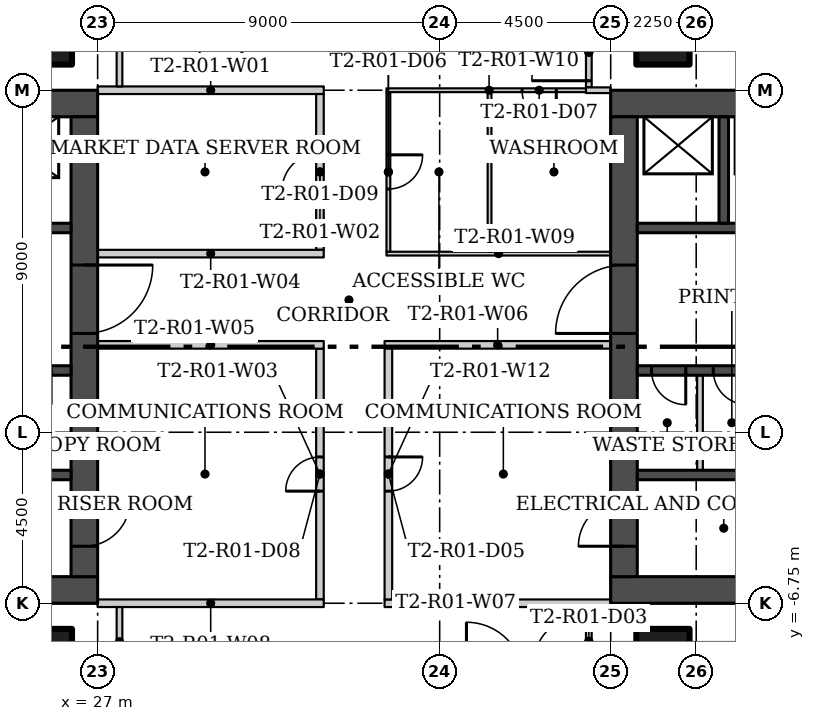
"""IFC4 building model, lengths in metres.
Left out: names, types, materials, properties, quantities, classifications, styles, units other than length and angle.
Written with IfcOpenShell. Run it as: python <this file> out.ifc"""

import sys

from ifc_helpers import new_model, si_unit, direction, frame, frame_2d, origin, origin_2d, place, context, subcontext, project, spatial, rectangle, hollow_rectangle, extrude, element, fill, save


model = new_model("IFC4")
c1 = context("Model", 3, precision=1e-05, world=origin(), true_north=direction((0.0, 1.0)))
c2 = subcontext(c1, "Body", "Model", "MODEL_VIEW")
j1 = project(units=[si_unit("LENGTHUNIT", "METRE"), si_unit("PLANEANGLEUNIT", "RADIAN")], contexts=[c1])
p1 = place(None, origin())
s1 = spatial("IfcSite", under=j1, at=p1, CompositionType="ELEMENT")
p2 = place(p1, origin())
s2 = spatial("IfcBuilding", under=s1, at=p2, CompositionType="ELEMENT")
p3 = place(p2, frame((0.0, 0.0, 28.5)))
s3 = spatial("IfcBuildingStorey", under=s2, at=p3, CompositionType="ELEMENT", Elevation=28.5)
for number, where in (
    (1, (25.625, 8.125, 0.0)),
    (2, (41.875, 8.125, 0.0)),
    (3, (25.625, -8.125, 0.0)),
    (4, (41.875, -8.125, 0.0)),
):
    element("IfcColumn", number, at=place(p3, frame(where)), inside=s3, PredefinedType="COLUMN", context=c2, shape_type="SweptSolid", body=[
        extrude(hollow_rectangle(XDim=1.4, YDim=1.4, WallThickness=0.05, at=origin_2d()), origin(), (0.0, 0.0, 1.0), 4.15),
    ])
p4 = place(p3, frame((32.95, 6.75, 0.0), z_axis=(0.0, 0.0, 1.0), x_axis=(-1.0, 0.0, 0.0)))
e5 = element("IfcWall", 5, at=p4, inside=s3, PredefinedType="PARTITIONING", context=c2, shape_type="SweptSolid", body=[
    extrude(rectangle(XDim=5.95, YDim=0.2, at=frame_2d((2.975, 0.0))), origin(), (0.0, 0.0, 1.0), 4.15),
])
p5 = place(p3, frame((32.85, 2.55, 0.0), z_axis=(0.0, 0.0, 1.0), x_axis=(0.0, 1.0, 0.0)))
e6 = element("IfcWall", 6, at=p5, inside=s3, PredefinedType="PARTITIONING", context=c2, shape_type="SweptSolid", body=[
    extrude(rectangle(XDim=4.1, YDim=0.2, at=frame_2d((2.05, 0.0))), origin(), (0.0, 0.0, 1.0), 4.15),
])
p6 = place(p5, frame((1.55, 0.0, 0.0)))
e7 = element("IfcOpeningElement", 7, at=p6, cuts=e6, PredefinedType="OPENING", context=c2, shape_type="SweptSolid", body=[
    extrude(rectangle(XDim=1.0, YDim=2.1, at=frame_2d((0.5, 1.05))), frame((0.0, 0.11, 0.0), z_axis=(0.0, -1.0, 0.0), x_axis=(1.0, 0.0, 0.0)), (0.0, 0.0, 1.0), 0.22),
])
p7 = place(p3, frame((32.85, -6.65, 0.0), z_axis=(0.0, 0.0, 1.0), x_axis=(0.0, 1.0, 0.0)))
e8 = element("IfcWall", 8, at=p7, inside=s3, PredefinedType="PARTITIONING", context=c2, shape_type="SweptSolid", body=[
    extrude(rectangle(XDim=6.6, YDim=0.2, at=frame_2d((3.3, 0.0))), origin(), (0.0, 0.0, 1.0), 4.15),
])
p8 = place(p7, frame((2.85, 0.0, 0.0)))
e9 = element("IfcOpeningElement", 9, at=p8, cuts=e8, PredefinedType="OPENING", context=c2, shape_type="SweptSolid", body=[
    extrude(rectangle(XDim=0.9, YDim=2.1, at=frame_2d((0.45, 1.05))), frame((0.0, 0.11, 0.0), z_axis=(0.0, -1.0, 0.0), x_axis=(1.0, 0.0, 0.0)), (0.0, 0.0, 1.0), 0.22),
])
p9 = place(p3, frame((27.0, 2.45, 0.0)))
e10 = element("IfcWall", 10, at=p9, inside=s3, PredefinedType="PARTITIONING", context=c2, shape_type="SweptSolid", body=[
    extrude(rectangle(XDim=5.95, YDim=0.2, at=frame_2d((2.975, 0.0))), origin(), (0.0, 0.0, 1.0), 4.15),
])
for number, where, z_axis, x_axis in (
    (11, (32.95, 0.05, 0.0), (0.0, 0.0, 1.0), (-1.0, 0.0, 0.0)),
    (12, (40.5, 0.05, 0.0), (0.0, 0.0, 1.0), (-1.0, 0.0, 0.0)),
):
    element("IfcWall", number, at=place(p3, frame(where, z_axis=z_axis, x_axis=x_axis)), inside=s3, PredefinedType="PARTITIONING", context=c2, shape_type="SweptSolid", body=[
        extrude(rectangle(XDim=5.95, YDim=0.2, at=frame_2d((2.975, 0.0))), origin(), (0.0, 0.0, 1.0), 4.15),
    ])
for number, where in (
    (13, (34.55, -6.75, 0.0)),
    (14, (27.0, -6.75, 0.0)),
):
    element("IfcWall", number, at=place(p3, frame(where)), inside=s3, PredefinedType="PARTITIONING", context=c2, shape_type="SweptSolid", body=[
        extrude(rectangle(XDim=5.95, YDim=0.2, at=frame_2d((2.975, 0.0))), origin(), (0.0, 0.0, 1.0), 4.15),
    ])
p10 = place(p3, frame((34.6, 2.45, 0.0)))
e15 = element("IfcWall", 15, at=p10, inside=s3, PredefinedType="PARTITIONING", context=c2, shape_type="SweptSolid", body=[
    extrude(rectangle(XDim=5.9, YDim=0.1, at=frame_2d((2.95, 0.0))), origin(), (0.0, 0.0, 1.0), 4.15),
])
p11 = place(p3, frame((40.0, 6.75, 0.0), z_axis=(0.0, 0.0, 1.0), x_axis=(-1.0, 0.0, 0.0)))
e16 = element("IfcWall", 16, at=p11, inside=s3, PredefinedType="PARTITIONING", context=c2, shape_type="SweptSolid", body=[
    extrude(rectangle(XDim=5.399, YDim=0.1, at=frame_2d((2.7, 0.0))), origin(), (0.0, 0.0, 1.0), 4.15),
])
p12 = place(p11, frame((0.931, 0.0, 0.0)))
e17 = element("IfcOpeningElement", 17, at=p12, cuts=e16, PredefinedType="OPENING", context=c2, shape_type="SweptSolid", body=[
    extrude(rectangle(XDim=0.9, YDim=2.1, at=frame_2d((0.45, 1.05))), frame((0.0, 0.06, 0.0), z_axis=(0.0, -1.0, 0.0), x_axis=(1.0, 0.0, 0.0)), (0.0, 0.0, 1.0), 0.12),
])
p13 = place(p3, frame((34.65, 6.7, 0.0), z_axis=(0.0, 0.0, 1.0), x_axis=(0.0, -1.0, 0.0)))
e18 = element("IfcWall", 18, at=p13, inside=s3, PredefinedType="PARTITIONING", context=c2, shape_type="SweptSolid", body=[
    extrude(rectangle(XDim=4.2, YDim=0.1, at=frame_2d((2.1, 0.0))), origin(), (0.0, 0.0, 1.0), 4.15),
])
p14 = place(p13, frame((1.65, 0.0, 0.0)))
e19 = element("IfcOpeningElement", 19, at=p14, cuts=e18, PredefinedType="OPENING", context=c2, shape_type="SweptSolid", body=[
    extrude(rectangle(XDim=0.9, YDim=2.1, at=frame_2d((0.45, 1.05))), frame((0.0, 0.06, 0.0), z_axis=(0.0, -1.0, 0.0), x_axis=(1.0, 0.0, 0.0)), (0.0, 0.0, 1.0), 0.12),
])
p15 = place(p3, frame((34.65, -0.05, 0.0), z_axis=(0.0, 0.0, 1.0), x_axis=(0.0, -1.0, 0.0)))
e20 = element("IfcWall", 20, at=p15, inside=s3, PredefinedType="PARTITIONING", context=c2, shape_type="SweptSolid", body=[
    extrude(rectangle(XDim=6.6, YDim=0.2, at=frame_2d((3.3, 0.0))), origin(), (0.0, 0.0, 1.0), 4.15),
])
p16 = place(p15, frame((2.85, 0.0, 0.0)))
e21 = element("IfcOpeningElement", 21, at=p16, cuts=e20, PredefinedType="OPENING", context=c2, shape_type="SweptSolid", body=[
    extrude(rectangle(XDim=0.9, YDim=2.1, at=frame_2d((0.45, 1.05))), frame((0.0, 0.11, 0.0), z_axis=(0.0, -1.0, 0.0), x_axis=(1.0, 0.0, 0.0)), (0.0, 0.0, 1.0), 0.22),
])
p17 = place(p3, frame((39.925, 6.825, 0.0), z_axis=(0.0, 0.0, 1.0), x_axis=(0.0, 1.0, 0.0)))
e22 = element("IfcWall", 22, at=p17, inside=s3, PredefinedType="PARTITIONING", context=c2, shape_type="SweptSolid", body=[
    extrude(rectangle(XDim=1.85, YDim=0.15, at=frame_2d((0.925, 0.0))), origin(), (0.0, 0.0, 1.0), 4.15),
])
p18 = place(p17, frame((0.175, 0.0, 0.0)))
e23 = element("IfcOpeningElement", 23, at=p18, cuts=e22, PredefinedType="OPENING", context=c2, shape_type="SweptSolid", body=[
    extrude(rectangle(XDim=1.5, YDim=2.4, at=frame_2d((0.75, 1.2))), frame((0.0, 0.085, 0.0), z_axis=(0.0, -1.0, 0.0), x_axis=(1.0, 0.0, 0.0)), (0.0, 0.0, 1.0), 0.17),
])
p19 = place(p3, frame((39.925, -8.675, 0.0), z_axis=(0.0, 0.0, 1.0), x_axis=(0.0, 1.0, 0.0)))
e24 = element("IfcWall", 24, at=p19, inside=s3, PredefinedType="PARTITIONING", context=c2, shape_type="SweptSolid", body=[
    extrude(rectangle(XDim=1.825, YDim=0.15, at=frame_2d((0.913, 0.0))), origin(), (0.0, 0.0, 1.0), 4.15),
])
p20 = place(p19, frame((0.175, 0.0, 0.0)))
e25 = element("IfcOpeningElement", 25, at=p20, cuts=e24, PredefinedType="OPENING", context=c2, shape_type="SweptSolid", body=[
    extrude(rectangle(XDim=1.5, YDim=2.4, at=frame_2d((0.75, 1.2))), frame((0.0, 0.085, 0.0), z_axis=(0.0, -1.0, 0.0), x_axis=(1.0, 0.0, 0.0)), (0.0, 0.0, 1.0), 0.17),
])
for number, where, z_axis, x_axis in (
    (26, (27.575, -6.85, 0.0), (0.0, 0.0, 1.0), (0.0, -1.0, 0.0)),
    (27, (27.575, 8.675, 0.0), (0.0, 0.0, 1.0), (0.0, -1.0, 0.0)),
):
    element("IfcWall", number, at=place(p3, frame(where, z_axis=z_axis, x_axis=x_axis)), inside=s3, PredefinedType="PARTITIONING", context=c2, shape_type="SweptSolid", body=[
        extrude(rectangle(XDim=1.825, YDim=0.15, at=frame_2d((0.913, 0.0))), origin(), (0.0, 0.0, 1.0), 4.15),
    ])
p21 = place(p3, frame((37.312, 6.7, 0.0), z_axis=(0.0, 0.0, 1.0), x_axis=(0.0, -1.0, 0.0)))
e28 = element("IfcWall", 28, at=p21, inside=s3, PredefinedType="PARTITIONING", context=c2, shape_type="SweptSolid", body=[
    extrude(rectangle(XDim=4.2, YDim=0.1, at=frame_2d((2.1, 0.0))), origin(), (0.0, 0.0, 1.0), 4.15),
])
p22 = place(p3, frame((40.5, 6.75, 0.0), z_axis=(0.0, 0.0, 1.0), x_axis=(-1.0, 0.0, 0.0)))
e29 = element("IfcWall", 29, at=p22, inside=s3, PredefinedType="PARTITIONING", context=c2, shape_type="SweptSolid", body=[
    extrude(rectangle(XDim=0.65, YDim=0.15, at=frame_2d((0.325, 0.0))), origin(), (0.0, 0.0, 1.0), 4.15),
])
for number, where in (
    (30, (13.5, -6.4, 0.0)),
    (31, (13.5, 6.4, 0.0)),
):
    element("IfcWall", number, at=place(p3, frame(where)), inside=s3, PredefinedType="SHEAR", context=c2, shape_type="SweptSolid", body=[
        extrude(rectangle(XDim=13.5, YDim=0.7, at=frame_2d((6.75, 0.0))), origin(), (0.0, 0.0, 1.0), 4.15),
    ])
p23 = place(p3, frame((26.65, 6.05, 0.0), z_axis=(0.0, 0.0, 1.0), x_axis=(0.0, -1.0, 0.0)))
e32 = element("IfcWall", 32, at=p23, inside=s3, PredefinedType="SHEAR", context=c2, shape_type="SweptSolid", body=[
    extrude(rectangle(XDim=12.1, YDim=0.7, at=frame_2d((6.05, 0.0))), origin(), (0.0, 0.0, 1.0), 4.15),
])
p24 = place(p23, frame((10.1, 0.0, 0.0)))
e33 = element("IfcOpeningElement", 33, at=p24, cuts=e32, PredefinedType="OPENING", context=c2, shape_type="SweptSolid", body=[
    extrude(rectangle(XDim=1.2, YDim=2.1, at=frame_2d((0.6, 1.05))), frame((0.0, 0.36, 0.0), z_axis=(0.0, -1.0, 0.0), x_axis=(1.0, 0.0, 0.0)), (0.0, 0.0, 1.0), 0.72),
])
p25 = place(p23, frame((3.9, 0.0, 0.0)))
e34 = element("IfcOpeningElement", 34, at=p25, cuts=e32, PredefinedType="OPENING", context=c2, shape_type="SweptSolid", body=[
    extrude(rectangle(XDim=1.8, YDim=2.4, at=frame_2d((0.9, 1.2))), frame((0.0, 0.36, 0.0), z_axis=(0.0, -1.0, 0.0), x_axis=(1.0, 0.0, 0.0)), (0.0, 0.0, 1.0), 0.72),
])
p26 = place(p3, frame((26.3, -3.375, 0.0), z_axis=(0.0, 0.0, 1.0), x_axis=(-1.0, 0.0, 0.0)))
e35 = element("IfcWall", 35, at=p26, inside=s3, PredefinedType="SHEAR", context=c2, shape_type="SweptSolid", body=[
    extrude(rectangle(XDim=12.1, YDim=0.25, at=frame_2d((6.05, 0.0))), origin(), (0.0, 0.0, 1.0), 4.15),
])
p27 = place(p26, frame((10.95, 0.0, 0.0)))
e36 = element("IfcOpeningElement", 36, at=p27, cuts=e35, PredefinedType="OPENING", context=c2, shape_type="SweptSolid", body=[
    extrude(rectangle(XDim=1.1, YDim=2.1, at=frame_2d((0.55, 1.05))), frame((0.0, 0.135, 0.0), z_axis=(0.0, -1.0, 0.0), x_axis=(1.0, 0.0, 0.0)), (0.0, 0.0, 1.0), 0.27),
])
p28 = place(p3, frame((26.3, -0.625, 0.0), z_axis=(0.0, 0.0, 1.0), x_axis=(-1.0, 0.0, 0.0)))
e37 = element("IfcWall", 37, at=p28, inside=s3, PredefinedType="SHEAR", context=c2, shape_type="SweptSolid", body=[
    extrude(rectangle(XDim=12.1, YDim=0.25, at=frame_2d((6.05, 0.0))), origin(), (0.0, 0.0, 1.0), 4.15),
])
p29 = place(p28, frame((8.65, 0.0, 0.0)))
e38 = element("IfcOpeningElement", 38, at=p29, cuts=e37, PredefinedType="OPENING", context=c2, shape_type="SweptSolid", body=[
    extrude(rectangle(XDim=1.2, YDim=2.1, at=frame_2d((0.6, 1.05))), frame((0.0, 0.135, 0.0), z_axis=(0.0, -1.0, 0.0), x_axis=(1.0, 0.0, 0.0)), (0.0, 0.0, 1.0), 0.27),
])
p30 = place(p28, frame((2.15, 0.0, 0.0)))
e39 = element("IfcOpeningElement", 39, at=p30, cuts=e37, PredefinedType="OPENING", context=c2, shape_type="SweptSolid", body=[
    extrude(rectangle(XDim=0.9, YDim=2.1, at=frame_2d((0.45, 1.05))), frame((0.0, 0.135, 0.0), z_axis=(0.0, -1.0, 0.0), x_axis=(1.0, 0.0, 0.0)), (0.0, 0.0, 1.0), 0.27),
])
p31 = place(p28, frame((0.525, 0.0, 0.0)))
e40 = element("IfcOpeningElement", 40, at=p31, cuts=e37, PredefinedType="OPENING", context=c2, shape_type="SweptSolid", body=[
    extrude(rectangle(XDim=0.9, YDim=2.1, at=frame_2d((0.45, 1.05))), frame((0.0, 0.135, 0.0), z_axis=(0.0, -1.0, 0.0), x_axis=(1.0, 0.0, 0.0)), (0.0, 0.0, 1.0), 0.27),
])
p32 = place(p3, frame((14.2, 3.125, 0.0)))
e41 = element("IfcWall", 41, at=p32, inside=s3, PredefinedType="SHEAR", context=c2, shape_type="SweptSolid", body=[
    extrude(rectangle(XDim=12.1, YDim=0.25, at=frame_2d((6.05, 0.0))), origin(), (0.0, 0.0, 1.0), 4.15),
])
p33 = place(p32, frame((0.85, 0.0, 0.0)))
e42 = element("IfcOpeningElement", 42, at=p33, cuts=e41, PredefinedType="OPENING", context=c2, shape_type="SweptSolid", body=[
    extrude(rectangle(XDim=1.1, YDim=2.1, at=frame_2d((0.55, 1.05))), frame((0.0, 0.135, 0.0), z_axis=(0.0, -1.0, 0.0), x_axis=(1.0, 0.0, 0.0)), (0.0, 0.0, 1.0), 0.27),
])
p34 = place(p32, frame((3.9, 0.0, 0.0)))
e43 = element("IfcOpeningElement", 43, at=p34, cuts=e41, PredefinedType="OPENING", context=c2, shape_type="SweptSolid", body=[
    extrude(rectangle(XDim=1.1, YDim=2.1, at=frame_2d((0.55, 1.05))), frame((0.0, 0.135, 0.0), z_axis=(0.0, -1.0, 0.0), x_axis=(1.0, 0.0, 0.0)), (0.0, 0.0, 1.0), 0.27),
])
for number, where, z_axis, x_axis in (
    (44, (54.0, -6.4, 0.0), (0.0, 0.0, 1.0), (-1.0, 0.0, 0.0)),
    (45, (54.0, 6.4, 0.0), (0.0, 0.0, 1.0), (-1.0, 0.0, 0.0)),
):
    element("IfcWall", number, at=place(p3, frame(where, z_axis=z_axis, x_axis=x_axis)), inside=s3, PredefinedType="SHEAR", context=c2, shape_type="SweptSolid", body=[
        extrude(rectangle(XDim=13.5, YDim=0.7, at=frame_2d((6.75, 0.0))), origin(), (0.0, 0.0, 1.0), 4.15),
    ])
p35 = place(p3, frame((40.85, -6.05, 0.0), z_axis=(0.0, 0.0, 1.0), x_axis=(0.0, 1.0, 0.0)))
e46 = element("IfcWall", 46, at=p35, inside=s3, PredefinedType="SHEAR", context=c2, shape_type="SweptSolid", body=[
    extrude(rectangle(XDim=12.1, YDim=0.7, at=frame_2d((6.05, 0.0))), origin(), (0.0, 0.0, 1.0), 4.15),
])
p36 = place(p35, frame((0.8, 0.0, 0.0)))
e47 = element("IfcOpeningElement", 47, at=p36, cuts=e46, PredefinedType="OPENING", context=c2, shape_type="SweptSolid", body=[
    extrude(rectangle(XDim=1.2, YDim=2.1, at=frame_2d((0.6, 1.05))), frame((0.0, 0.36, 0.0), z_axis=(0.0, -1.0, 0.0), x_axis=(1.0, 0.0, 0.0)), (0.0, 0.0, 1.0), 0.72),
])
p37 = place(p35, frame((6.4, 0.0, 0.0)))
e48 = element("IfcOpeningElement", 48, at=p37, cuts=e46, PredefinedType="OPENING", context=c2, shape_type="SweptSolid", body=[
    extrude(rectangle(XDim=1.8, YDim=2.4, at=frame_2d((0.9, 1.2))), frame((0.0, 0.36, 0.0), z_axis=(0.0, -1.0, 0.0), x_axis=(1.0, 0.0, 0.0)), (0.0, 0.0, 1.0), 0.72),
])
p38 = place(p3, frame((53.3, -3.375, 0.0), z_axis=(0.0, 0.0, 1.0), x_axis=(-1.0, 0.0, 0.0)))
e49 = element("IfcWall", 49, at=p38, inside=s3, PredefinedType="SHEAR", context=c2, shape_type="SweptSolid", body=[
    extrude(rectangle(XDim=12.1, YDim=0.25, at=frame_2d((6.05, 0.0))), origin(), (0.0, 0.0, 1.0), 4.15),
])
p39 = place(p38, frame((0.05, 0.0, 0.0)))
e50 = element("IfcOpeningElement", 50, at=p39, cuts=e49, PredefinedType="OPENING", context=c2, shape_type="SweptSolid", body=[
    extrude(rectangle(XDim=1.1, YDim=2.1, at=frame_2d((0.55, 1.05))), frame((0.0, 0.135, 0.0), z_axis=(0.0, -1.0, 0.0), x_axis=(1.0, 0.0, 0.0)), (0.0, 0.0, 1.0), 0.27),
])
p40 = place(p3, frame((53.3, -0.625, 0.0), z_axis=(0.0, 0.0, 1.0), x_axis=(-1.0, 0.0, 0.0)))
e51 = element("IfcWall", 51, at=p40, inside=s3, PredefinedType="SHEAR", context=c2, shape_type="SweptSolid", body=[
    extrude(rectangle(XDim=12.1, YDim=0.25, at=frame_2d((6.05, 0.0))), origin(), (0.0, 0.0, 1.0), 4.15),
])
p41 = place(p40, frame((2.25, 0.0, 0.0)))
e52 = element("IfcOpeningElement", 52, at=p41, cuts=e51, PredefinedType="OPENING", context=c2, shape_type="SweptSolid", body=[
    extrude(rectangle(XDim=1.2, YDim=2.1, at=frame_2d((0.6, 1.05))), frame((0.0, 0.135, 0.0), z_axis=(0.0, -1.0, 0.0), x_axis=(1.0, 0.0, 0.0)), (0.0, 0.0, 1.0), 0.27),
])
p42 = place(p40, frame((9.2, 0.0, 0.0)))
e53 = element("IfcOpeningElement", 53, at=p42, cuts=e51, PredefinedType="OPENING", context=c2, shape_type="SweptSolid", body=[
    extrude(rectangle(XDim=0.9, YDim=2.1, at=frame_2d((0.45, 1.05))), frame((0.0, 0.135, 0.0), z_axis=(0.0, -1.0, 0.0), x_axis=(1.0, 0.0, 0.0)), (0.0, 0.0, 1.0), 0.27),
])
p43 = place(p40, frame((10.825, 0.0, 0.0)))
e54 = element("IfcOpeningElement", 54, at=p43, cuts=e51, PredefinedType="OPENING", context=c2, shape_type="SweptSolid", body=[
    extrude(rectangle(XDim=0.9, YDim=2.1, at=frame_2d((0.45, 1.05))), frame((0.0, 0.135, 0.0), z_axis=(0.0, -1.0, 0.0), x_axis=(1.0, 0.0, 0.0)), (0.0, 0.0, 1.0), 0.27),
])
p44 = place(p3, frame((42.85, -3.25, 0.0), z_axis=(0.0, 0.0, 1.0), x_axis=(0.0, 1.0, 0.0)))
e55 = element("IfcWall", 55, at=p44, inside=s3, PredefinedType="PARTITIONING", context=c2, shape_type="SweptSolid", body=[
    extrude(rectangle(XDim=2.5, YDim=0.15, at=frame_2d((1.25, 0.0))), origin(), (0.0, 0.0, 1.0), 4.15),
])
p45 = place(p3, frame((46.0, 3.125, 0.0), z_axis=(0.0, 0.0, 1.0), x_axis=(-1.0, 0.0, 0.0)))
e56 = element("IfcWall", 56, at=p45, inside=s3, PredefinedType="SHEAR", context=c2, shape_type="SweptSolid", body=[
    extrude(rectangle(XDim=4.8, YDim=0.25, at=frame_2d((2.4, 0.0))), origin(), (0.0, 0.0, 1.0), 4.15),
])
p46 = place(p45, frame((0.775, 0.0, 0.0)))
e57 = element("IfcOpeningElement", 57, at=p46, cuts=e56, PredefinedType="OPENING", context=c2, shape_type="SweptSolid", body=[
    extrude(rectangle(XDim=1.1, YDim=2.1, at=frame_2d((0.55, 1.05))), frame((0.0, 0.135, 0.0), z_axis=(0.0, -1.0, 0.0), x_axis=(1.0, 0.0, 0.0)), (0.0, 0.0, 1.0), 0.27),
])
p47 = place(p3, frame((43.475, 3.25, 0.0), z_axis=(0.0, 0.0, 1.0), x_axis=(0.0, 1.0, 0.0)))
e58 = element("IfcWall", 58, at=p47, inside=s3, PredefinedType="SHEAR", context=c2, shape_type="SweptSolid", body=[
    extrude(rectangle(XDim=2.8, YDim=0.25, at=frame_2d((1.4, 0.0))), origin(), (0.0, 0.0, 1.0), 4.15),
])
p48 = place(p20, origin())
e59 = element("IfcDoor", 59, at=p48, inside=s3, OperationType="DOUBLE_DOOR_SINGLE_SWING", PredefinedType="DOOR", context=c2, shape_type="SweptSolid", body=[
    extrude(rectangle(XDim=1.5, YDim=2.4, at=frame_2d((0.75, 1.2))), frame((0.0, 0.025, 0.0), z_axis=(0.0, -1.0, 0.0), x_axis=(1.0, 0.0, 0.0)), (0.0, 0.0, 1.0), 0.05),
])
fill(e25, e59)
p49 = place(p18, origin())
e60 = element("IfcDoor", 60, at=p49, inside=s3, OperationType="DOUBLE_DOOR_SINGLE_SWING", PredefinedType="DOOR", context=c2, shape_type="SweptSolid", body=[
    extrude(rectangle(XDim=1.5, YDim=2.4, at=frame_2d((0.75, 1.2))), frame((0.0, 0.025, 0.0), z_axis=(0.0, -1.0, 0.0), x_axis=(1.0, 0.0, 0.0)), (0.0, 0.0, 1.0), 0.05),
])
fill(e23, e60)
p50 = place(p16, origin())
e61 = element("IfcDoor", 61, at=p50, inside=s3, OperationType="SINGLE_SWING_RIGHT", PredefinedType="DOOR", context=c2, shape_type="SweptSolid", body=[
    extrude(rectangle(XDim=0.9, YDim=2.1, at=frame_2d((0.45, 1.05))), frame((0.0, 0.025, 0.0), z_axis=(0.0, -1.0, 0.0), x_axis=(1.0, 0.0, 0.0)), (0.0, 0.0, 1.0), 0.05),
])
fill(e21, e61)
p51 = place(p14, origin())
e62 = element("IfcDoor", 62, at=p51, inside=s3, OperationType="SINGLE_SWING_RIGHT", PredefinedType="DOOR", context=c2, shape_type="SweptSolid", body=[
    extrude(rectangle(XDim=0.9, YDim=2.1, at=frame_2d((0.45, 1.05))), frame((0.0, 0.025, 0.0), z_axis=(0.0, -1.0, 0.0), x_axis=(1.0, 0.0, 0.0)), (0.0, 0.0, 1.0), 0.05),
])
fill(e19, e62)
p52 = place(p12, origin())
e63 = element("IfcDoor", 63, at=p52, inside=s3, OperationType="SINGLE_SWING_RIGHT", PredefinedType="DOOR", context=c2, shape_type="SweptSolid", body=[
    extrude(rectangle(XDim=0.9, YDim=2.1, at=frame_2d((0.45, 1.05))), frame((0.0, 0.025, 0.0), z_axis=(0.0, -1.0, 0.0), x_axis=(1.0, 0.0, 0.0)), (0.0, 0.0, 1.0), 0.05),
])
fill(e17, e63)
p53 = place(p8, origin())
e64 = element("IfcDoor", 64, at=p53, inside=s3, OperationType="SINGLE_SWING_RIGHT", PredefinedType="DOOR", context=c2, shape_type="SweptSolid", body=[
    extrude(rectangle(XDim=0.9, YDim=2.1, at=frame_2d((0.45, 1.05))), frame((0.0, 0.025, 0.0), z_axis=(0.0, -1.0, 0.0), x_axis=(1.0, 0.0, 0.0)), (0.0, 0.0, 1.0), 0.05),
])
fill(e9, e64)
p54 = place(p6, origin())
e65 = element("IfcDoor", 65, at=p54, inside=s3, OperationType="SINGLE_SWING_RIGHT", PredefinedType="DOOR", context=c2, shape_type="SweptSolid", body=[
    extrude(rectangle(XDim=1.0, YDim=2.1, at=frame_2d((0.5, 1.05))), frame((0.0, 0.025, 0.0), z_axis=(0.0, -1.0, 0.0), x_axis=(1.0, 0.0, 0.0)), (0.0, 0.0, 1.0), 0.05),
])
fill(e7, e65)
p55 = place(p24, origin())
e66 = element("IfcDoor", 66, at=p55, inside=s3, OperationType="SINGLE_SWING_RIGHT", PredefinedType="DOOR", context=c2, shape_type="SweptSolid", body=[
    extrude(rectangle(XDim=1.2, YDim=2.1, at=frame_2d((0.6, 1.05))), frame((0.0, 0.025, 0.0), z_axis=(0.0, -1.0, 0.0), x_axis=(1.0, 0.0, 0.0)), (0.0, 0.0, 1.0), 0.05),
])
fill(e33, e66)
p56 = place(p25, origin())
e67 = element("IfcDoor", 67, at=p56, inside=s3, OperationType="DOUBLE_DOOR_SINGLE_SWING", PredefinedType="DOOR", context=c2, shape_type="SweptSolid", body=[
    extrude(rectangle(XDim=1.8, YDim=2.4, at=frame_2d((0.9, 1.2))), frame((0.0, 0.025, 0.0), z_axis=(0.0, -1.0, 0.0), x_axis=(1.0, 0.0, 0.0)), (0.0, 0.0, 1.0), 0.05),
])
fill(e34, e67)
p57 = place(p36, origin())
e68 = element("IfcDoor", 68, at=p57, inside=s3, OperationType="SINGLE_SWING_LEFT", PredefinedType="DOOR", context=c2, shape_type="SweptSolid", body=[
    extrude(rectangle(XDim=1.2, YDim=2.1, at=frame_2d((0.6, 1.05))), frame((0.0, 0.025, 0.0), z_axis=(0.0, -1.0, 0.0), x_axis=(1.0, 0.0, 0.0)), (0.0, 0.0, 1.0), 0.05),
])
fill(e47, e68)
p58 = place(p37, origin())
e69 = element("IfcDoor", 69, at=p58, inside=s3, OperationType="DOUBLE_DOOR_SINGLE_SWING", PredefinedType="DOOR", context=c2, shape_type="SweptSolid", body=[
    extrude(rectangle(XDim=1.8, YDim=2.4, at=frame_2d((0.9, 1.2))), frame((0.0, 0.025, 0.0), z_axis=(0.0, -1.0, 0.0), x_axis=(1.0, 0.0, 0.0)), (0.0, 0.0, 1.0), 0.05),
])
fill(e48, e69)
p59 = place(p42, origin())
e70 = element("IfcDoor", 70, at=p59, inside=s3, OperationType="SINGLE_SWING_RIGHT", PredefinedType="DOOR", context=c2, shape_type="SweptSolid", body=[
    extrude(rectangle(XDim=0.9, YDim=2.1, at=frame_2d((0.45, 1.05))), frame((0.0, 0.025, 0.0), z_axis=(0.0, -1.0, 0.0), x_axis=(1.0, 0.0, 0.0)), (0.0, 0.0, 1.0), 0.05),
])
fill(e53, e70)
p60 = place(p43, origin())
e71 = element("IfcDoor", 71, at=p60, inside=s3, OperationType="SINGLE_SWING_RIGHT", PredefinedType="DOOR", context=c2, shape_type="SweptSolid", body=[
    extrude(rectangle(XDim=0.9, YDim=2.1, at=frame_2d((0.45, 1.05))), frame((0.0, 0.025, 0.0), z_axis=(0.0, -1.0, 0.0), x_axis=(1.0, 0.0, 0.0)), (0.0, 0.0, 1.0), 0.05),
])
fill(e54, e71)
save(model, sys.argv[1])
